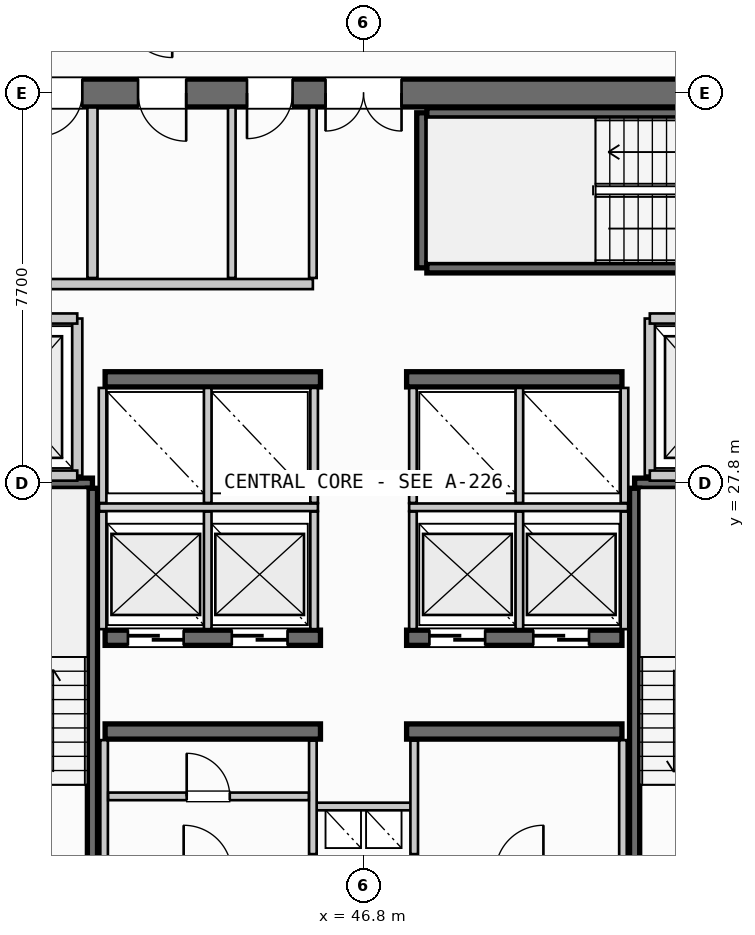
"""IFC4 building model, lengths in metres.
Left out: names, types, materials, properties, quantities, classifications, styles, units other than length and angle.
Written with IfcOpenShell. Run it as: python <this file> out.ifc"""

import sys

from ifc_helpers import new_model, si_unit, direction, frame, frame_2d, origin, place, context, subcontext, project, spatial, rectangle, extrude, source, transform, mapped, element, fill, save


model = new_model("IFC4")
c1 = context("Model", 3, precision=1e-05, world=origin(), true_north=direction((0.0, 1.0)))
c2 = subcontext(c1, "Body", "Model", "MODEL_VIEW")
j1 = project(units=[si_unit("LENGTHUNIT", "METRE"), si_unit("PLANEANGLEUNIT", "RADIAN")], contexts=[c1])
p1 = place(None, origin())
s1 = spatial("IfcSite", under=j1, at=p1, CompositionType="ELEMENT")
p2 = place(p1, origin())
s2 = spatial("IfcBuilding", under=s1, at=p2, CompositionType="ELEMENT")
p3 = place(p2, frame((0.0, 0.0, 190.4)))
s3 = spatial("IfcBuildingStorey", under=s2, at=p3, CompositionType="ELEMENT", Elevation=190.4)
p4 = place(p3, frame((55.6, 35.5, 0.0), z_axis=(0.0, 0.0, 1.0), x_axis=(-1.0, 0.0, 0.0)))
e1 = element("IfcWall", 1, at=p4, inside=s3, PredefinedType="SHEAR", context=c2, shape_type="SweptSolid", body=[
    extrude(rectangle(XDim=17.6, YDim=0.55, at=frame_2d((8.8, 0.0))), origin(), (0.0, 0.0, 1.0), 3.26),
])
p5 = place(p4, frame((8.05, 0.0, 0.0)))
e2 = element("IfcOpeningElement", 2, at=p5, cuts=e1, PredefinedType="OPENING", context=c2, shape_type="SweptSolid", body=[
    extrude(rectangle(XDim=1.5, YDim=2.2, at=frame_2d((0.75, 1.1))), frame((0.0, 0.285, 0.0), z_axis=(0.0, -1.0, 0.0), x_axis=(1.0, 0.0, 0.0)), (0.0, 0.0, 1.0), 0.57),
])
p6 = place(p4, frame((15.85, 0.0, 0.0)))
e3 = element("IfcOpeningElement", 3, at=p6, cuts=e1, PredefinedType="OPENING", context=c2, shape_type="SweptSolid", body=[
    extrude(rectangle(XDim=0.85, YDim=2.15, at=frame_2d((0.425, 1.075))), frame((0.0, 0.285, 0.0), z_axis=(0.0, -1.0, 0.0), x_axis=(1.0, 0.0, 0.0)), (0.0, 0.0, 1.0), 0.57),
])
p7 = place(p4, frame((14.35, 0.0, 0.0)))
e4 = element("IfcOpeningElement", 4, at=p7, cuts=e1, PredefinedType="OPENING", context=c2, shape_type="SweptSolid", body=[
    extrude(rectangle(XDim=0.85, YDim=2.15, at=frame_2d((0.425, 1.075))), frame((0.0, 0.285, 0.0), z_axis=(0.0, -1.0, 0.0), x_axis=(1.0, 0.0, 0.0)), (0.0, 0.0, 1.0), 0.57),
])
p8 = place(p4, frame((12.3, 0.0, 0.0)))
e5 = element("IfcOpeningElement", 5, at=p8, cuts=e1, PredefinedType="OPENING", context=c2, shape_type="SweptSolid", body=[
    extrude(rectangle(XDim=0.95, YDim=2.15, at=frame_2d((0.475, 1.075))), frame((0.0, 0.285, 0.0), z_axis=(0.0, -1.0, 0.0), x_axis=(1.0, 0.0, 0.0)), (0.0, 0.0, 1.0), 0.57),
])
p9 = place(p4, frame((10.2, 0.0, 0.0)))
e6 = element("IfcOpeningElement", 6, at=p9, cuts=e1, PredefinedType="OPENING", context=c2, shape_type="SweptSolid", body=[
    extrude(rectangle(XDim=0.9, YDim=2.15, at=frame_2d((0.45, 1.075))), frame((0.0, 0.285, 0.0), z_axis=(0.0, -1.0, 0.0), x_axis=(1.0, 0.0, 0.0)), (0.0, 0.0, 1.0), 0.57),
])
for number, where, z_axis, x_axis in (
    (7, (41.7, 22.9, 0.0), (0.0, 0.0, 1.0), (1.0, 0.0, 0.0)),
    (8, (47.65, 22.9, 0.0), (0.0, 0.0, 1.0), (1.0, 0.0, 0.0)),
):
    element("IfcWall", number, at=place(p3, frame(where, z_axis=z_axis, x_axis=x_axis)), inside=s3, PredefinedType="SHEAR", context=c2, shape_type="SweptSolid", body=[
        extrude(rectangle(XDim=4.25, YDim=0.3, at=frame_2d((2.125, 0.0))), origin(), (0.0, 0.0, 1.0), 3.26),
    ])
p10 = place(p3, frame((41.7, 24.75, 0.0), z_axis=(0.0, 0.0, 1.0), x_axis=(1.0, 0.0, 0.0)))
e9 = element("IfcWall", 9, at=p10, inside=s3, PredefinedType="SHEAR", context=c2, shape_type="SweptSolid", body=[
    extrude(rectangle(XDim=4.25, YDim=0.3, at=frame_2d((2.125, 0.0))), origin(), (0.0, 0.0, 1.0), 3.26),
])
p11 = place(p10, frame((0.45, 0.0, 0.0)))
e10 = element("IfcOpeningElement", 10, at=p11, cuts=e9, PredefinedType="OPENING", context=c2, shape_type="SweptSolid", body=[
    extrude(rectangle(XDim=1.1, YDim=2.2, at=frame_2d((0.55, 1.1))), frame((0.0, 0.16, 0.0), z_axis=(0.0, -1.0, 0.0), x_axis=(1.0, 0.0, 0.0)), (0.0, 0.0, 1.0), 0.32),
])
p12 = place(p10, frame((2.5, 0.0, 0.0)))
e11 = element("IfcOpeningElement", 11, at=p12, cuts=e9, PredefinedType="OPENING", context=c2, shape_type="SweptSolid", body=[
    extrude(rectangle(XDim=1.1, YDim=2.2, at=frame_2d((0.55, 1.1))), frame((0.0, 0.16, 0.0), z_axis=(0.0, -1.0, 0.0), x_axis=(1.0, 0.0, 0.0)), (0.0, 0.0, 1.0), 0.32),
])
p13 = place(p3, frame((47.65, 24.75, 0.0), z_axis=(0.0, 0.0, 1.0), x_axis=(1.0, 0.0, 0.0)))
e12 = element("IfcWall", 12, at=p13, inside=s3, PredefinedType="SHEAR", context=c2, shape_type="SweptSolid", body=[
    extrude(rectangle(XDim=4.25, YDim=0.3, at=frame_2d((2.125, 0.0))), origin(), (0.0, 0.0, 1.0), 3.26),
])
p14 = place(p13, frame((0.45, 0.0, 0.0)))
e13 = element("IfcOpeningElement", 13, at=p14, cuts=e12, PredefinedType="OPENING", context=c2, shape_type="SweptSolid", body=[
    extrude(rectangle(XDim=1.1, YDim=2.2, at=frame_2d((0.55, 1.1))), frame((0.0, 0.16, 0.0), z_axis=(0.0, -1.0, 0.0), x_axis=(1.0, 0.0, 0.0)), (0.0, 0.0, 1.0), 0.32),
])
p15 = place(p13, frame((2.5, 0.0, 0.0)))
e14 = element("IfcOpeningElement", 14, at=p15, cuts=e12, PredefinedType="OPENING", context=c2, shape_type="SweptSolid", body=[
    extrude(rectangle(XDim=1.1, YDim=2.2, at=frame_2d((0.55, 1.1))), frame((0.0, 0.16, 0.0), z_axis=(0.0, -1.0, 0.0), x_axis=(1.0, 0.0, 0.0)), (0.0, 0.0, 1.0), 0.32),
])
for number, where, z_axis, x_axis in (
    (15, (41.7, 29.85, 0.0), (0.0, 0.0, 1.0), (1.0, 0.0, 0.0)),
    (16, (47.65, 29.85, 0.0), (0.0, 0.0, 1.0), (1.0, 0.0, 0.0)),
):
    element("IfcWall", number, at=place(p3, frame(where, z_axis=z_axis, x_axis=x_axis)), inside=s3, PredefinedType="SHEAR", context=c2, shape_type="SweptSolid", body=[
        extrude(rectangle(XDim=4.25, YDim=0.3, at=frame_2d((2.125, 0.0))), origin(), (0.0, 0.0, 1.0), 3.26),
    ])
p16 = place(p3, frame((38.39, 27.8, 0.0), z_axis=(0.0, 0.0, 1.0), x_axis=(1.0, 0.0, 0.0)))
e17 = element("IfcWall", 17, at=p16, inside=s3, PredefinedType="SHEAR", context=c2, shape_type="SweptSolid", body=[
    extrude(rectangle(XDim=3.06, YDim=0.2, at=frame_2d((1.53, 0.0))), origin(), (0.0, 0.0, 1.0), 3.26),
])
p17 = place(p3, frame((41.45, 27.7, 0.0), z_axis=(0.0, 0.0, 1.0), x_axis=(0.0, -1.0, 0.0)))
e18 = element("IfcWall", 18, at=p17, inside=s3, PredefinedType="SHEAR", context=c2, shape_type="SweptSolid", body=[
    extrude(rectangle(XDim=7.35, YDim=0.2, at=frame_2d((3.675, 0.0))), origin(), (0.0, 0.0, 1.0), 3.26),
])
p18 = place(p3, frame((52.15, 27.8, 0.0), z_axis=(0.0, 0.0, 1.0), x_axis=(1.0, 0.0, 0.0)))
e19 = element("IfcWall", 19, at=p18, inside=s3, PredefinedType="SHEAR", context=c2, shape_type="SweptSolid", body=[
    extrude(rectangle(XDim=3.06, YDim=0.2, at=frame_2d((1.53, 0.0))), origin(), (0.0, 0.0, 1.0), 3.26),
])
p19 = place(p3, frame((52.15, 20.35, 0.0), z_axis=(0.0, 0.0, 1.0), x_axis=(0.0, 1.0, 0.0)))
e20 = element("IfcWall", 20, at=p19, inside=s3, PredefinedType="SHEAR", context=c2, shape_type="SweptSolid", body=[
    extrude(rectangle(XDim=7.35, YDim=0.2, at=frame_2d((3.675, 0.0))), origin(), (0.0, 0.0, 1.0), 3.26),
])
p20 = place(p3, frame((47.95, 32.05, 0.0), z_axis=(0.0, 0.0, 1.0), x_axis=(0.0, 1.0, 0.0)))
e21 = element("IfcWall", 21, at=p20, inside=s3, PredefinedType="SHEAR", context=c2, shape_type="SweptSolid", body=[
    extrude(rectangle(XDim=3.06, YDim=0.2, at=frame_2d((1.53, 0.0))), origin(), (0.0, 0.0, 1.0), 3.26),
])
for number, where, z_axis, x_axis in (
    (22, (48.05, 35.11, 0.0), (0.0, 0.0, 1.0), (1.0, 0.0, 0.0)),
    (23, (55.4, 32.05, 0.0), (0.0, 0.0, 1.0), (-1.0, 0.0, 0.0)),
):
    element("IfcWall", number, at=place(p3, frame(where, z_axis=z_axis, x_axis=x_axis)), inside=s3, PredefinedType="SHEAR", context=c2, shape_type="SweptSolid", body=[
        extrude(rectangle(XDim=7.35, YDim=0.2, at=frame_2d((3.675, 0.0))), origin(), (0.0, 0.0, 1.0), 3.26),
    ])
p21 = place(p3, frame((45.8, 21.42, 0.0), z_axis=(0.0, 0.0, 1.0), x_axis=(1.0, 0.0, 0.0)))
e24 = element("IfcWall", 24, at=p21, inside=s3, PredefinedType="PARTITIONING", context=c2, shape_type="SweptSolid", body=[
    extrude(rectangle(XDim=2.0, YDim=0.15, at=frame_2d((1.0, 0.0))), origin(), (0.0, 0.0, 1.0), 2.735),
])
for number, where, z_axis, x_axis in (
    (25, (45.8, 20.48, 0.0), (0.0, 0.0, 1.0), (0.0, 1.0, 0.0)),
    (26, (47.8, 20.48, 0.0), (0.0, 0.0, 1.0), (0.0, 1.0, 0.0)),
):
    element("IfcWall", number, at=place(p3, frame(where, z_axis=z_axis, x_axis=x_axis)), inside=s3, PredefinedType="PARTITIONING", context=c2, shape_type="SweptSolid", body=[
        extrude(rectangle(XDim=2.24, YDim=0.15, at=frame_2d((1.12, 0.0))), origin(), (0.0, 0.0, 1.0), 2.735),
    ])
p22 = place(p3, frame((41.15, 27.95, 0.0), z_axis=(0.0, 0.0, 1.0), x_axis=(0.0, 1.0, 0.0)))
e27 = element("IfcWall", 27, at=p22, inside=s3, PredefinedType="PARTITIONING", context=c2, shape_type="SweptSolid", body=[
    extrude(rectangle(XDim=3.1, YDim=0.2, at=frame_2d((1.55, 0.0))), origin(), (0.0, 0.0, 1.0), 2.735),
])
for number, where, z_axis, x_axis in (
    (28, (38.285, 27.95, 0.0), (0.0, 0.0, 1.0), (1.0, 0.0, 0.0)),
    (29, (38.285, 31.05, 0.0), (0.0, 0.0, 1.0), (1.0, 0.0, 0.0)),
):
    element("IfcWall", number, at=place(p3, frame(where, z_axis=z_axis, x_axis=x_axis)), inside=s3, PredefinedType="PARTITIONING", context=c2, shape_type="SweptSolid", body=[
        extrude(rectangle(XDim=2.865, YDim=0.2, at=frame_2d((1.433, 0.0))), origin(), (0.0, 0.0, 1.0), 2.735),
    ])
p23 = place(p3, frame((52.45, 27.95, 0.0), z_axis=(0.0, 0.0, 1.0), x_axis=(0.0, 1.0, 0.0)))
e30 = element("IfcWall", 30, at=p23, inside=s3, PredefinedType="PARTITIONING", context=c2, shape_type="SweptSolid", body=[
    extrude(rectangle(XDim=3.1, YDim=0.2, at=frame_2d((1.55, 0.0))), origin(), (0.0, 0.0, 1.0), 2.735),
])
for number, where, z_axis, x_axis in (
    (31, (52.45, 27.95, 0.0), (0.0, 0.0, 1.0), (1.0, 0.0, 0.0)),
    (32, (52.45, 31.05, 0.0), (0.0, 0.0, 1.0), (1.0, 0.0, 0.0)),
):
    element("IfcWall", number, at=place(p3, frame(where, z_axis=z_axis, x_axis=x_axis)), inside=s3, PredefinedType="PARTITIONING", context=c2, shape_type="SweptSolid", body=[
        extrude(rectangle(XDim=2.865, YDim=0.2, at=frame_2d((1.433, 0.0))), origin(), (0.0, 0.0, 1.0), 2.735),
    ])
for number, where, z_axis, x_axis in (
    (33, (41.68, 20.385, 0.0), (0.0, 0.0, 1.0), (0.0, 1.0, 0.0)),
    (34, (51.92, 20.385, 0.0), (0.0, 0.0, 1.0), (0.0, 1.0, 0.0)),
):
    element("IfcWall", number, at=place(p3, frame(where, z_axis=z_axis, x_axis=x_axis)), inside=s3, PredefinedType="PARTITIONING", context=c2, shape_type="SweptSolid", body=[
        extrude(rectangle(XDim=2.345, YDim=0.15, at=frame_2d((1.172, 0.0))), origin(), (0.0, 0.0, 1.0), 2.735),
    ])
p24 = place(p3, frame((41.76, 21.62, 0.0), z_axis=(0.0, 0.0, 1.0), x_axis=(1.0, 0.0, 0.0)))
e35 = element("IfcWall", 35, at=p24, inside=s3, PredefinedType="PARTITIONING", context=c2, shape_type="SweptSolid", body=[
    extrude(rectangle(XDim=3.96, YDim=0.15, at=frame_2d((1.98, 0.0))), origin(), (0.0, 0.0, 1.0), 2.735),
])
p25 = place(p24, frame((1.55, 0.0, 0.0)))
e36 = element("IfcOpeningElement", 36, at=p25, cuts=e35, PredefinedType="OPENING", context=c2, shape_type="SweptSolid", body=[
    extrude(rectangle(XDim=0.85, YDim=2.15, at=frame_2d((0.425, 1.075))), frame((0.0, 0.085, 0.0), z_axis=(0.0, -1.0, 0.0), x_axis=(1.0, 0.0, 0.0)), (0.0, 0.0, 1.0), 0.17),
])
p26 = place(p3, frame((41.58, 27.325, 0.0), z_axis=(0.0, 0.0, 1.0), x_axis=(1.0, 0.0, 0.0)))
e37 = element("IfcWall", 37, at=p26, inside=s3, PredefinedType="PARTITIONING", context=c2, shape_type="SweptSolid", body=[
    extrude(rectangle(XDim=4.32, YDim=0.15, at=frame_2d((2.16, 0.0))), origin(), (0.0, 0.0, 1.0), 2.735),
])
p27 = place(p3, frame((47.7, 27.325, 0.0), z_axis=(0.0, 0.0, 1.0), x_axis=(1.0, 0.0, 0.0)))
e38 = element("IfcWall", 38, at=p27, inside=s3, PredefinedType="PARTITIONING", context=c2, shape_type="SweptSolid", body=[
    extrude(rectangle(XDim=4.32, YDim=0.15, at=frame_2d((2.16, 0.0))), origin(), (0.0, 0.0, 1.0), 2.735),
])
for number, where, z_axis, x_axis in (
    (39, (41.65, 24.92, 0.0), (0.0, 0.0, 1.0), (0.0, 1.0, 0.0)),
    (40, (43.725, 24.92, 0.0), (0.0, 0.0, 1.0), (0.0, 1.0, 0.0)),
    (41, (45.825, 24.92, 0.0), (0.0, 0.0, 1.0), (0.0, 1.0, 0.0)),
    (42, (47.775, 24.92, 0.0), (0.0, 0.0, 1.0), (0.0, 1.0, 0.0)),
    (43, (49.875, 24.92, 0.0), (0.0, 0.0, 1.0), (0.0, 1.0, 0.0)),
    (44, (51.95, 24.92, 0.0), (0.0, 0.0, 1.0), (0.0, 1.0, 0.0)),
):
    element("IfcWall", number, at=place(p3, frame(where, z_axis=z_axis, x_axis=x_axis)), inside=s3, PredefinedType="PARTITIONING", context=c2, shape_type="SweptSolid", body=[
        extrude(rectangle(XDim=2.32, YDim=0.15, at=frame_2d((1.16, 0.0))), origin(), (0.0, 0.0, 1.0), 2.735),
    ])
for number, where, z_axis, x_axis in (
    (45, (41.65, 27.41, 0.0), (0.0, 0.0, 1.0), (0.0, 1.0, 0.0)),
    (46, (43.725, 27.41, 0.0), (0.0, 0.0, 1.0), (0.0, 1.0, 0.0)),
    (47, (45.825, 27.41, 0.0), (0.0, 0.0, 1.0), (0.0, 1.0, 0.0)),
    (48, (47.775, 27.41, 0.0), (0.0, 0.0, 1.0), (0.0, 1.0, 0.0)),
    (49, (49.875, 27.41, 0.0), (0.0, 0.0, 1.0), (0.0, 1.0, 0.0)),
    (50, (51.95, 27.41, 0.0), (0.0, 0.0, 1.0), (0.0, 1.0, 0.0)),
):
    element("IfcWall", number, at=place(p3, frame(where, z_axis=z_axis, x_axis=x_axis)), inside=s3, PredefinedType="PARTITIONING", context=c2, shape_type="SweptSolid", body=[
        extrude(rectangle(XDim=2.27, YDim=0.15, at=frame_2d((1.135, 0.0))), origin(), (0.0, 0.0, 1.0), 2.735),
    ])
p28 = place(p3, frame((41.45, 31.85, 0.0), z_axis=(0.0, 0.0, 1.0), x_axis=(0.0, 1.0, 0.0)))
e51 = element("IfcWall", 51, at=p28, inside=s3, PredefinedType="PARTITIONING", context=c2, shape_type="SweptSolid", body=[
    extrude(rectangle(XDim=3.365, YDim=0.2, at=frame_2d((1.683, 0.0))), origin(), (0.0, 0.0, 1.0), 2.735),
])
p29 = place(p3, frame((38.285, 31.73, 0.0), z_axis=(0.0, 0.0, 1.0), x_axis=(1.0, 0.0, 0.0)))
e52 = element("IfcWall", 52, at=p29, inside=s3, PredefinedType="PARTITIONING", context=c2, shape_type="SweptSolid", body=[
    extrude(rectangle(XDim=7.515, YDim=0.2, at=frame_2d((3.758, 0.0))), origin(), (0.0, 0.0, 1.0), 2.735),
])
p30 = place(p3, frame((45.8, 31.85, 0.0), z_axis=(0.0, 0.0, 1.0), x_axis=(0.0, 1.0, 0.0)))
e53 = element("IfcWall", 53, at=p30, inside=s3, PredefinedType="PARTITIONING", context=c2, shape_type="SweptSolid", body=[
    extrude(rectangle(XDim=3.365, YDim=0.15, at=frame_2d((1.683, 0.0))), origin(), (0.0, 0.0, 1.0), 2.735),
])
p31 = place(p3, frame((44.2, 31.85, 0.0), z_axis=(0.0, 0.0, 1.0), x_axis=(0.0, 1.0, 0.0)))
e54 = element("IfcWall", 54, at=p31, inside=s3, PredefinedType="PLUMBINGWALL", context=c2, shape_type="SweptSolid", body=[
    extrude(rectangle(XDim=3.365, YDim=0.15, at=frame_2d((1.683, 0.0))), origin(), (0.0, 0.0, 1.0), 2.735),
])
m1 = source(origin(), c2, "Body", "SweptSolid", [
    extrude(rectangle(XDim=1.5, YDim=2.2, at=frame_2d((0.75, 1.1))), frame((0.0, 0.025, 0.0), z_axis=(0.0, -1.0, 0.0), x_axis=(1.0, 0.0, 0.0)), (0.0, 0.0, 1.0), 0.05),
])
p32 = place(p5, origin())
e55 = element("IfcDoor", 55, at=p32, inside=s3, OperationType="DOUBLE_DOOR_SINGLE_SWING", PredefinedType="DOOR", context=c2, shape_type="MappedRepresentation", body=[
    mapped(m1, transform((0.0, 0.0, 0.0), scale=1.0)),
])
fill(e2, e55)
m2 = source(origin(), c2, "Body", "SweptSolid", [
    extrude(rectangle(XDim=1.1, YDim=2.2, at=frame_2d((0.55, 1.1))), frame((0.0, 0.025, 0.0), z_axis=(0.0, -1.0, 0.0), x_axis=(1.0, 0.0, 0.0)), (0.0, 0.0, 1.0), 0.05),
])
p33 = place(p11, origin())
e56 = element("IfcDoor", 56, at=p33, inside=s3, OperationType="SLIDING_TO_RIGHT", PredefinedType="DOOR", context=c2, shape_type="MappedRepresentation", body=[
    mapped(m2, transform((0.0, 0.0, 0.0), scale=1.0)),
])
fill(e10, e56)
p34 = place(p12, origin())
e57 = element("IfcDoor", 57, at=p34, inside=s3, OperationType="SLIDING_TO_RIGHT", PredefinedType="DOOR", context=c2, shape_type="MappedRepresentation", body=[
    mapped(m2, transform((0.0, 0.0, 0.0), scale=1.0)),
])
fill(e11, e57)
p35 = place(p14, origin())
e58 = element("IfcDoor", 58, at=p35, inside=s3, OperationType="SLIDING_TO_RIGHT", PredefinedType="DOOR", context=c2, shape_type="MappedRepresentation", body=[
    mapped(m2, transform((0.0, 0.0, 0.0), scale=1.0)),
])
fill(e13, e58)
p36 = place(p15, origin())
e59 = element("IfcDoor", 59, at=p36, inside=s3, OperationType="SLIDING_TO_RIGHT", PredefinedType="DOOR", context=c2, shape_type="MappedRepresentation", body=[
    mapped(m2, transform((0.0, 0.0, 0.0), scale=1.0)),
])
fill(e14, e59)
m3 = source(origin(), c2, "Body", "SweptSolid", [
    extrude(rectangle(XDim=0.85, YDim=2.15, at=frame_2d((0.425, 1.075))), frame((0.0, 0.025, 0.0), z_axis=(0.0, -1.0, 0.0), x_axis=(1.0, 0.0, 0.0)), (0.0, 0.0, 1.0), 0.05),
])
p37 = place(p7, origin())
e60 = element("IfcDoor", 60, at=p37, inside=s3, OperationType="SINGLE_SWING_RIGHT", PredefinedType="DOOR", context=c2, shape_type="MappedRepresentation", body=[
    mapped(m3, transform((0.0, 0.0, 0.0), scale=1.0)),
])
fill(e4, e60)
m4 = source(origin(), c2, "Body", "SweptSolid", [
    extrude(rectangle(XDim=0.95, YDim=2.15, at=frame_2d((0.475, 1.075))), frame((0.0, 0.025, 0.0), z_axis=(0.0, -1.0, 0.0), x_axis=(1.0, 0.0, 0.0)), (0.0, 0.0, 1.0), 0.05),
])
p38 = place(p8, origin())
e61 = element("IfcDoor", 61, at=p38, inside=s3, OperationType="SINGLE_SWING_LEFT", PredefinedType="DOOR", context=c2, shape_type="MappedRepresentation", body=[
    mapped(m4, transform((0.0, 0.0, 0.0), scale=1.0)),
])
fill(e5, e61)
m5 = source(origin(), c2, "Body", "SweptSolid", [
    extrude(rectangle(XDim=0.9, YDim=2.15, at=frame_2d((0.45, 1.075))), frame((0.0, 0.025, 0.0), z_axis=(0.0, -1.0, 0.0), x_axis=(1.0, 0.0, 0.0)), (0.0, 0.0, 1.0), 0.05),
])
p39 = place(p9, origin())
e62 = element("IfcDoor", 62, at=p39, inside=s3, OperationType="SINGLE_SWING_RIGHT", PredefinedType="DOOR", context=c2, shape_type="MappedRepresentation", body=[
    mapped(m5, transform((0.0, 0.0, 0.0), scale=1.0)),
])
fill(e6, e62)
p40 = place(p25, origin())
e63 = element("IfcDoor", 63, at=p40, inside=s3, OperationType="SINGLE_SWING_LEFT", PredefinedType="DOOR", context=c2, shape_type="MappedRepresentation", body=[
    mapped(m3, transform((0.0, 0.0, 0.0), scale=1.0)),
])
fill(e36, e63)
save(model, sys.argv[1])
